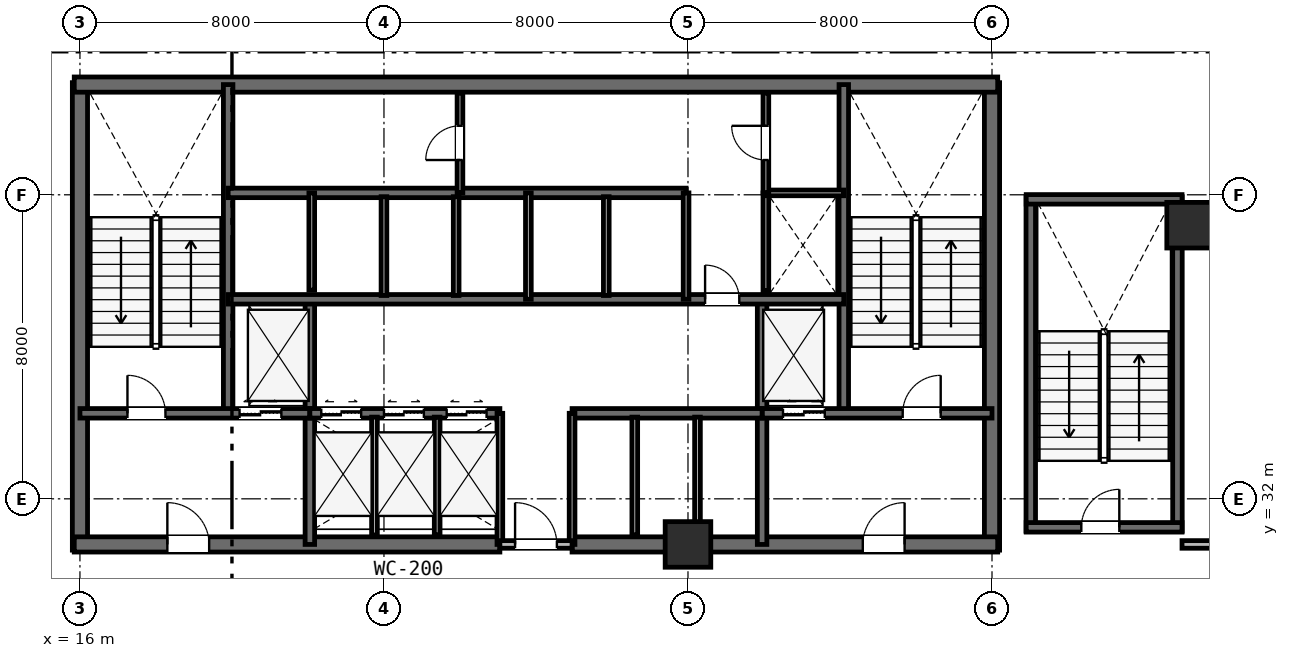
"""IFC4 building model, lengths in metres.
Left out: names, types, materials, properties, quantities, classifications, styles, units other than length and angle.
Written with IfcOpenShell. Run it as: python <this file> out.ifc"""

import sys

from ifc_helpers import new_model, si_unit, direction, frame, frame_2d, origin, origin_2d, place, context, subcontext, project, spatial, rectangle, extrude, element, fill, save


model = new_model("IFC4")
c1 = context("Model", 3, precision=1e-05, world=origin(), true_north=direction((0.0, 1.0)))
c2 = subcontext(c1, "Body", "Model", "MODEL_VIEW")
j1 = project(units=[si_unit("LENGTHUNIT", "METRE"), si_unit("PLANEANGLEUNIT", "RADIAN")], contexts=[c1])
p1 = place(None, origin())
s1 = spatial("IfcSite", under=j1, at=p1, CompositionType="ELEMENT")
p2 = place(p1, origin())
s2 = spatial("IfcBuilding", under=s1, at=p2, CompositionType="ELEMENT")
p3 = place(p2, frame((0.0, 0.0, -9.4)))
s3 = spatial("IfcBuildingStorey", under=s2, at=p3, CompositionType="ELEMENT", Elevation=-9.4)
for number, where, z_axis, x_axis in (
    (1, (16.0, 30.65, 0.0), (0.0, 0.0, 1.0), (0.0, 1.0, 0.0)),
    (2, (40.0, 30.65, 0.0), (0.0, 0.0, 1.0), (0.0, 1.0, 0.0)),
):
    element("IfcWall", number, at=place(p3, frame(where, z_axis=z_axis, x_axis=x_axis)), inside=s3, PredefinedType="SHEAR", context=c2, shape_type="SweptSolid", body=[
        extrude(rectangle(XDim=12.3, YDim=0.4, at=frame_2d((6.15, 0.0))), origin(), (0.0, 0.0, 1.0), 3.8),
    ])
p4 = place(p3, frame((15.85, 42.9, 0.0), z_axis=(0.0, 0.0, 1.0), x_axis=(1.0, 0.0, 0.0)))
e3 = element("IfcWall", 3, at=p4, inside=s3, PredefinedType="SHEAR", context=c2, shape_type="SweptSolid", body=[
    extrude(rectangle(XDim=24.3, YDim=0.4, at=frame_2d((12.15, 0.0))), origin(), (0.0, 0.0, 1.0), 3.8),
])
p5 = place(p3, frame((15.85, 30.8, 0.0), z_axis=(0.0, 0.0, 1.0), x_axis=(1.0, 0.0, 0.0)))
e4 = element("IfcWall", 4, at=p5, inside=s3, PredefinedType="SHEAR", context=c2, shape_type="SweptSolid", body=[
    extrude(rectangle(XDim=11.2, YDim=0.4, at=frame_2d((5.6, 0.0))), origin(), (0.0, 0.0, 1.0), 3.8),
])
p6 = place(p5, frame((2.45, 0.0, 0.0)))
e5 = element("IfcOpeningElement", 5, at=p6, cuts=e4, PredefinedType="OPENING", context=c2, shape_type="SweptSolid", body=[
    extrude(rectangle(XDim=1.1, YDim=2.15, at=frame_2d((0.55, 1.075))), frame((0.0, 0.21, 0.0), z_axis=(0.0, -1.0, 0.0), x_axis=(1.0, 0.0, 0.0)), (0.0, 0.0, 1.0), 0.42),
])
p7 = place(p3, frame((28.95, 30.8, 0.0), z_axis=(0.0, 0.0, 1.0), x_axis=(1.0, 0.0, 0.0)))
e6 = element("IfcWall", 6, at=p7, inside=s3, PredefinedType="SHEAR", context=c2, shape_type="SweptSolid", body=[
    extrude(rectangle(XDim=11.2, YDim=0.4, at=frame_2d((5.6, 0.0))), origin(), (0.0, 0.0, 1.0), 3.8),
])
p8 = place(p7, frame((7.65, 0.0, 0.0)))
e7 = element("IfcOpeningElement", 7, at=p8, cuts=e6, PredefinedType="OPENING", context=c2, shape_type="SweptSolid", body=[
    extrude(rectangle(XDim=1.1, YDim=2.15, at=frame_2d((0.55, 1.075))), frame((0.0, 0.21, 0.0), z_axis=(0.0, -1.0, 0.0), x_axis=(1.0, 0.0, 0.0)), (0.0, 0.0, 1.0), 0.42),
])
for number, where, z_axis, x_axis in (
    (8, (19.9, 34.25, 0.0), (0.0, 0.0, 1.0), (0.0, 1.0, 0.0)),
    (9, (36.1, 34.25, 0.0), (0.0, 0.0, 1.0), (0.0, 1.0, 0.0)),
):
    element("IfcWall", number, at=place(p3, frame(where, z_axis=z_axis, x_axis=x_axis)), inside=s3, PredefinedType="SHEAR", context=c2, shape_type="SweptSolid", body=[
        extrude(rectangle(XDim=8.65, YDim=0.25, at=frame_2d((4.325, 0.0))), origin(), (0.0, 0.0, 1.0), 3.8),
    ])
for number, where, z_axis, x_axis in (
    (10, (22.05, 30.8, 0.0), (0.0, 0.0, 1.0), (0.0, 1.0, 0.0)),
    (11, (33.95, 30.8, 0.0), (0.0, 0.0, 1.0), (0.0, 1.0, 0.0)),
):
    element("IfcWall", number, at=place(p3, frame(where, z_axis=z_axis, x_axis=x_axis)), inside=s3, PredefinedType="SHEAR", context=c2, shape_type="SweptSolid", body=[
        extrude(rectangle(XDim=6.45, YDim=0.25, at=frame_2d((3.225, 0.0))), origin(), (0.0, 0.0, 1.0), 3.8),
    ])
p9 = place(p3, frame((16.0, 34.25, 0.0), z_axis=(0.0, 0.0, 1.0), x_axis=(1.0, 0.0, 0.0)))
e12 = element("IfcWall", 12, at=p9, inside=s3, PredefinedType="SHEAR", context=c2, shape_type="SweptSolid", body=[
    extrude(rectangle(XDim=6.05, YDim=0.25, at=frame_2d((3.025, 0.0))), origin(), (0.0, 0.0, 1.0), 3.8),
])
p10 = place(p9, frame((1.25, 0.0, 0.0)))
e13 = element("IfcOpeningElement", 13, at=p10, cuts=e12, PredefinedType="OPENING", context=c2, shape_type="SweptSolid", body=[
    extrude(rectangle(XDim=1.0, YDim=2.15, at=frame_2d((0.5, 1.075))), frame((0.0, 0.135, 0.0), z_axis=(0.0, -1.0, 0.0), x_axis=(1.0, 0.0, 0.0)), (0.0, 0.0, 1.0), 0.27),
])
p11 = place(p9, frame((4.2, 0.0, 0.0)))
e14 = element("IfcOpeningElement", 14, at=p11, cuts=e12, PredefinedType="OPENING", context=c2, shape_type="SweptSolid", body=[
    extrude(rectangle(XDim=1.1, YDim=2.15, at=frame_2d((0.55, 1.075))), frame((0.0, 0.135, 0.0), z_axis=(0.0, -1.0, 0.0), x_axis=(1.0, 0.0, 0.0)), (0.0, 0.0, 1.0), 0.27),
])
p12 = place(p3, frame((33.95, 34.25, 0.0), z_axis=(0.0, 0.0, 1.0), x_axis=(1.0, 0.0, 0.0)))
e15 = element("IfcWall", 15, at=p12, inside=s3, PredefinedType="SHEAR", context=c2, shape_type="SweptSolid", body=[
    extrude(rectangle(XDim=6.05, YDim=0.25, at=frame_2d((3.025, 0.0))), origin(), (0.0, 0.0, 1.0), 3.8),
])
p13 = place(p12, frame((3.7, 0.0, 0.0)))
e16 = element("IfcOpeningElement", 16, at=p13, cuts=e15, PredefinedType="OPENING", context=c2, shape_type="SweptSolid", body=[
    extrude(rectangle(XDim=1.0, YDim=2.15, at=frame_2d((0.5, 1.075))), frame((0.0, 0.135, 0.0), z_axis=(0.0, -1.0, 0.0), x_axis=(1.0, 0.0, 0.0)), (0.0, 0.0, 1.0), 0.27),
])
p14 = place(p12, frame((0.55, 0.0, 0.0)))
e17 = element("IfcOpeningElement", 17, at=p14, cuts=e15, PredefinedType="OPENING", context=c2, shape_type="SweptSolid", body=[
    extrude(rectangle(XDim=1.1, YDim=2.15, at=frame_2d((0.55, 1.075))), frame((0.0, 0.135, 0.0), z_axis=(0.0, -1.0, 0.0), x_axis=(1.0, 0.0, 0.0)), (0.0, 0.0, 1.0), 0.27),
])
p15 = place(p3, frame((22.05, 34.25, 0.0), z_axis=(0.0, 0.0, 1.0), x_axis=(1.0, 0.0, 0.0)))
e18 = element("IfcWall", 18, at=p15, inside=s3, PredefinedType="SHEAR", context=c2, shape_type="SweptSolid", body=[
    extrude(rectangle(XDim=5.0, YDim=0.25, at=frame_2d((2.5, 0.0))), origin(), (0.0, 0.0, 1.0), 3.8),
])
p16 = place(p15, frame((0.3, 0.0, 0.0)))
e19 = element("IfcOpeningElement", 19, at=p16, cuts=e18, PredefinedType="OPENING", context=c2, shape_type="SweptSolid", body=[
    extrude(rectangle(XDim=1.05, YDim=2.15, at=frame_2d((0.525, 1.075))), frame((0.0, 0.135, 0.0), z_axis=(0.0, -1.0, 0.0), x_axis=(1.0, 0.0, 0.0)), (0.0, 0.0, 1.0), 0.27),
])
p17 = place(p15, frame((1.95, 0.0, 0.0)))
e20 = element("IfcOpeningElement", 20, at=p17, cuts=e18, PredefinedType="OPENING", context=c2, shape_type="SweptSolid", body=[
    extrude(rectangle(XDim=1.05, YDim=2.15, at=frame_2d((0.525, 1.075))), frame((0.0, 0.135, 0.0), z_axis=(0.0, -1.0, 0.0), x_axis=(1.0, 0.0, 0.0)), (0.0, 0.0, 1.0), 0.27),
])
p18 = place(p15, frame((3.6, 0.0, 0.0)))
e21 = element("IfcOpeningElement", 21, at=p18, cuts=e18, PredefinedType="OPENING", context=c2, shape_type="SweptSolid", body=[
    extrude(rectangle(XDim=1.05, YDim=2.15, at=frame_2d((0.525, 1.075))), frame((0.0, 0.135, 0.0), z_axis=(0.0, -1.0, 0.0), x_axis=(1.0, 0.0, 0.0)), (0.0, 0.0, 1.0), 0.27),
])
p19 = place(p3, frame((28.95, 34.25, 0.0), z_axis=(0.0, 0.0, 1.0), x_axis=(1.0, 0.0, 0.0)))
e22 = element("IfcWall", 22, at=p19, inside=s3, PredefinedType="SHEAR", context=c2, shape_type="SweptSolid", body=[
    extrude(rectangle(XDim=5.0, YDim=0.25, at=frame_2d((2.5, 0.0))), origin(), (0.0, 0.0, 1.0), 3.8),
])
p20 = place(p3, frame((19.9, 37.25, 0.0), z_axis=(0.0, 0.0, 1.0), x_axis=(1.0, 0.0, 0.0)))
e23 = element("IfcWall", 23, at=p20, inside=s3, PredefinedType="SHEAR", context=c2, shape_type="SweptSolid", body=[
    extrude(rectangle(XDim=16.2, YDim=0.25, at=frame_2d((8.1, 0.0))), origin(), (0.0, 0.0, 1.0), 3.8),
])
p21 = place(p20, frame((12.55, 0.0, 0.0)))
e24 = element("IfcOpeningElement", 24, at=p21, cuts=e23, PredefinedType="OPENING", context=c2, shape_type="SweptSolid", body=[
    extrude(rectangle(XDim=0.9, YDim=2.15, at=frame_2d((0.45, 1.075))), frame((0.0, 0.135, 0.0), z_axis=(0.0, -1.0, 0.0), x_axis=(1.0, 0.0, 0.0)), (0.0, 0.0, 1.0), 0.27),
])
p22 = place(p3, frame((19.9, 40.05, 0.0), z_axis=(0.0, 0.0, 1.0), x_axis=(1.0, 0.0, 0.0)))
e25 = element("IfcWall", 25, at=p22, inside=s3, PredefinedType="SHEAR", context=c2, shape_type="SweptSolid", body=[
    extrude(rectangle(XDim=12.05, YDim=0.25, at=frame_2d((6.025, 0.0))), origin(), (0.0, 0.0, 1.0), 3.8),
])
for number, where, z_axis, x_axis in (
    (26, (41.02, 31.15, 0.0), (0.0, 0.0, 1.0), (0.0, 1.0, 0.0)),
    (27, (44.88, 31.15, 0.0), (0.0, 0.0, 1.0), (0.0, 1.0, 0.0)),
):
    element("IfcWall", number, at=place(p3, frame(where, z_axis=z_axis, x_axis=x_axis)), inside=s3, PredefinedType="SHEAR", context=c2, shape_type="SweptSolid", body=[
        extrude(rectangle(XDim=8.8, YDim=0.25, at=frame_2d((4.4, 0.0))), origin(), (0.0, 0.0, 1.0), 3.8),
    ])
p23 = place(p3, frame((40.9, 39.88, 0.0), z_axis=(0.0, 0.0, 1.0), x_axis=(1.0, 0.0, 0.0)))
e28 = element("IfcWall", 28, at=p23, inside=s3, PredefinedType="SHEAR", context=c2, shape_type="SweptSolid", body=[
    extrude(rectangle(XDim=4.1, YDim=0.25, at=frame_2d((2.05, 0.0))), origin(), (0.0, 0.0, 1.0), 3.8),
])
p24 = place(p3, frame((40.9, 31.25, 0.0), z_axis=(0.0, 0.0, 1.0), x_axis=(1.0, 0.0, 0.0)))
e29 = element("IfcWall", 29, at=p24, inside=s3, PredefinedType="SHEAR", context=c2, shape_type="SweptSolid", body=[
    extrude(rectangle(XDim=4.1, YDim=0.25, at=frame_2d((2.05, 0.0))), origin(), (0.0, 0.0, 1.0), 3.8),
])
p25 = place(p24, frame((1.45, 0.0, 0.0)))
e30 = element("IfcOpeningElement", 30, at=p25, cuts=e29, PredefinedType="OPENING", context=c2, shape_type="SweptSolid", body=[
    extrude(rectangle(XDim=1.0, YDim=2.15, at=frame_2d((0.5, 1.075))), frame((0.0, 0.135, 0.0), z_axis=(0.0, -1.0, 0.0), x_axis=(1.0, 0.0, 0.0)), (0.0, 0.0, 1.0), 0.27),
])
for number, where, z_axis, x_axis in (
    (31, (45.2, 39.2, 0.0), (0.0, 0.0, 1.0), (1.0, 0.0, 0.0)),
    (32, (32.0, 30.8, 0.0), (0.0, 0.0, 1.0), (1.0, 0.0, 0.0)),
):
    element("IfcColumn", number, at=place(p3, frame(where, z_axis=z_axis, x_axis=x_axis)), inside=s3, PredefinedType="COLUMN", context=c2, shape_type="SweptSolid", body=[
        extrude(rectangle(XDim=1.2, YDim=1.2, at=origin_2d()), origin(), (0.0, 0.0, 1.0), 3.8),
    ])
for number, where, z_axis, x_axis in (
    (33, (27.05, 30.8, 0.0), (0.0, 0.0, 1.0), (0.0, 1.0, 0.0)),
    (34, (28.95, 30.8, 0.0), (0.0, 0.0, 1.0), (0.0, 1.0, 0.0)),
):
    element("IfcWall", number, at=place(p3, frame(where, z_axis=z_axis, x_axis=x_axis)), inside=s3, PredefinedType="PLUMBINGWALL", context=c2, shape_type="SweptSolid", body=[
        extrude(rectangle(XDim=3.45, YDim=0.15, at=frame_2d((1.725, 0.0))), origin(), (0.0, 0.0, 1.0), 3.49),
    ])
p26 = place(p3, frame((27.05, 30.8, 0.0), z_axis=(0.0, 0.0, 1.0), x_axis=(1.0, 0.0, 0.0)))
e35 = element("IfcWall", 35, at=p26, inside=s3, PredefinedType="PARTITIONING", context=c2, shape_type="SweptSolid", body=[
    extrude(rectangle(XDim=1.9, YDim=0.2, at=frame_2d((0.95, 0.0))), origin(), (0.0, 0.0, 1.0), 3.49),
])
p27 = place(p26, frame((0.4, 0.0, 0.0)))
e36 = element("IfcOpeningElement", 36, at=p27, cuts=e35, PredefinedType="OPENING", context=c2, shape_type="SweptSolid", body=[
    extrude(rectangle(XDim=1.1, YDim=2.15, at=frame_2d((0.55, 1.075))), frame((0.0, 0.11, 0.0), z_axis=(0.0, -1.0, 0.0), x_axis=(1.0, 0.0, 0.0)), (0.0, 0.0, 1.0), 0.22),
])
for number, where, z_axis, x_axis in (
    (37, (23.75, 31.05, 0.0), (0.0, 0.0, 1.0), (0.0, 1.0, 0.0)),
    (38, (25.4, 31.05, 0.0), (0.0, 0.0, 1.0), (0.0, 1.0, 0.0)),
    (39, (30.6, 31.05, 0.0), (0.0, 0.0, 1.0), (0.0, 1.0, 0.0)),
):
    element("IfcWall", number, at=place(p3, frame(where, z_axis=z_axis, x_axis=x_axis)), inside=s3, PredefinedType="PLUMBINGWALL", context=c2, shape_type="SweptSolid", body=[
        extrude(rectangle(XDim=3.1, YDim=0.15, at=frame_2d((1.55, 0.0))), origin(), (0.0, 0.0, 1.0), 3.49),
    ])
p28 = place(p3, frame((32.25, 31.05, 0.0), z_axis=(0.0, 0.0, 1.0), x_axis=(0.0, 1.0, 0.0)))
e40 = element("IfcWall", 40, at=p28, inside=s3, PredefinedType="PLUMBINGWALL", context=c2, shape_type="SweptSolid", body=[
    extrude(rectangle(XDim=3.1, YDim=0.15, at=frame_2d((1.55, 0.0))), origin(), (0.0, 0.0, 1.0), 2.88),
])
p29 = place(p3, frame((22.1, 37.49, 0.0), z_axis=(0.0, 0.0, 1.0), x_axis=(0.0, 1.0, 0.0)))
e41 = element("IfcWall", 41, at=p29, inside=s3, PredefinedType="PLUMBINGWALL", context=c2, shape_type="SweptSolid", body=[
    extrude(rectangle(XDim=2.56, YDim=0.15, at=frame_2d((1.28, 0.0))), origin(), (0.0, 0.0, 1.0), 3.49),
])
p30 = place(p3, frame((27.8, 37.25, 0.0), z_axis=(0.0, 0.0, 1.0), x_axis=(0.0, 1.0, 0.0)))
e42 = element("IfcWall", 42, at=p30, inside=s3, PredefinedType="PLUMBINGWALL", context=c2, shape_type="SweptSolid", body=[
    extrude(rectangle(XDim=2.8, YDim=0.15, at=frame_2d((1.4, 0.0))), origin(), (0.0, 0.0, 1.0), 3.49),
])
for number, where, z_axis, x_axis in (
    (43, (24.0, 37.35, 0.0), (0.0, 0.0, 1.0), (0.0, 1.0, 0.0)),
    (44, (25.9, 37.35, 0.0), (0.0, 0.0, 1.0), (0.0, 1.0, 0.0)),
):
    element("IfcWall", number, at=place(p3, frame(where, z_axis=z_axis, x_axis=x_axis)), inside=s3, PredefinedType="PLUMBINGWALL", context=c2, shape_type="SweptSolid", body=[
        extrude(rectangle(XDim=2.6, YDim=0.15, at=frame_2d((1.3, 0.0))), origin(), (0.0, 0.0, 1.0), 3.49),
    ])
p31 = place(p3, frame((31.95, 37.25, 0.0), z_axis=(0.0, 0.0, 1.0), x_axis=(0.0, 1.0, 0.0)))
e45 = element("IfcWall", 45, at=p31, inside=s3, PredefinedType="PLUMBINGWALL", context=c2, shape_type="SweptSolid", body=[
    extrude(rectangle(XDim=2.8, YDim=0.15, at=frame_2d((1.4, 0.0))), origin(), (0.0, 0.0, 1.0), 3.49),
])
p32 = place(p3, frame((29.85, 37.35, 0.0), z_axis=(0.0, 0.0, 1.0), x_axis=(0.0, 1.0, 0.0)))
e46 = element("IfcWall", 46, at=p32, inside=s3, PredefinedType="PLUMBINGWALL", context=c2, shape_type="SweptSolid", body=[
    extrude(rectangle(XDim=2.6, YDim=0.15, at=frame_2d((1.3, 0.0))), origin(), (0.0, 0.0, 1.0), 3.49),
])
p33 = place(p3, frame((34.05, 37.473, 0.0), z_axis=(0.0, 0.0, 1.0), x_axis=(0.0, 1.0, 0.0)))
e47 = element("IfcWall", 47, at=p33, inside=s3, PredefinedType="PLUMBINGWALL", context=c2, shape_type="SweptSolid", body=[
    extrude(rectangle(XDim=2.577, YDim=0.15, at=frame_2d((1.288, 0.0))), origin(), (0.0, 0.0, 1.0), 3.49),
])
p34 = place(p3, frame((34.05, 40.05, 0.0), z_axis=(0.0, 0.0, 1.0), x_axis=(1.0, 0.0, 0.0)))
e48 = element("IfcWall", 48, at=p34, inside=s3, PredefinedType="PARTITIONING", context=c2, shape_type="SweptSolid", body=[
    extrude(rectangle(XDim=2.05, YDim=0.15, at=frame_2d((1.025, 0.0))), origin(), (0.0, 0.0, 1.0), 3.49),
])
p35 = place(p3, frame((34.05, 40.05, 0.0), z_axis=(0.0, 0.0, 1.0), x_axis=(0.0, 1.0, 0.0)))
e49 = element("IfcWall", 49, at=p35, inside=s3, PredefinedType="PARTITIONING", context=c2, shape_type="SweptSolid", body=[
    extrude(rectangle(XDim=2.63, YDim=0.15, at=frame_2d((1.315, 0.0))), origin(), (0.0, 0.0, 1.0), 3.49),
])
p36 = place(p35, frame((0.865, 0.0, 0.0)))
e50 = element("IfcOpeningElement", 50, at=p36, cuts=e49, PredefinedType="OPENING", context=c2, shape_type="SweptSolid", body=[
    extrude(rectangle(XDim=0.9, YDim=2.15, at=frame_2d((0.45, 1.075))), frame((0.0, 0.085, 0.0), z_axis=(0.0, -1.0, 0.0), x_axis=(1.0, 0.0, 0.0)), (0.0, 0.0, 1.0), 0.17),
])
p37 = place(p3, frame((26.0, 40.05, 0.0), z_axis=(0.0, 0.0, 1.0), x_axis=(0.0, 1.0, 0.0)))
e51 = element("IfcWall", 51, at=p37, inside=s3, PredefinedType="PARTITIONING", context=c2, shape_type="SweptSolid", body=[
    extrude(rectangle(XDim=2.63, YDim=0.15, at=frame_2d((1.315, 0.0))), origin(), (0.0, 0.0, 1.0), 3.49),
])
p38 = place(p37, frame((0.865, 0.0, 0.0)))
e52 = element("IfcOpeningElement", 52, at=p38, cuts=e51, PredefinedType="OPENING", context=c2, shape_type="SweptSolid", body=[
    extrude(rectangle(XDim=0.9, YDim=2.15, at=frame_2d((0.45, 1.075))), frame((0.0, 0.085, 0.0), z_axis=(0.0, -1.0, 0.0), x_axis=(1.0, 0.0, 0.0)), (0.0, 0.0, 1.0), 0.17),
])
p39 = place(p3, frame((45.0, 30.8, 0.0), z_axis=(0.0, 0.0, 1.0), x_axis=(1.0, 0.0, 0.0)))
e53 = element("IfcWall", 53, at=p39, inside=s3, PredefinedType="PARTITIONING", context=c2, shape_type="SweptSolid", body=[
    extrude(rectangle(XDim=10.45, YDim=0.2, at=frame_2d((5.225, 0.0))), origin(), (0.0, 0.0, 1.0), 2.88),
])
p40 = place(p27, origin())
e54 = element("IfcDoor", 54, at=p40, inside=s3, OperationType="SINGLE_SWING_LEFT", PredefinedType="DOOR", context=c2, shape_type="SweptSolid", body=[
    extrude(rectangle(XDim=1.1, YDim=2.15, at=frame_2d((0.55, 1.075))), frame((0.0, 0.025, 0.0), z_axis=(0.0, -1.0, 0.0), x_axis=(1.0, 0.0, 0.0)), (0.0, 0.0, 1.0), 0.05),
])
fill(e36, e54)
p41 = place(p10, origin())
e55 = element("IfcDoor", 55, at=p41, inside=s3, OperationType="SINGLE_SWING_LEFT", PredefinedType="DOOR", context=c2, shape_type="SweptSolid", body=[
    extrude(rectangle(XDim=1.0, YDim=2.15, at=frame_2d((0.5, 1.075))), frame((0.0, 0.025, 0.0), z_axis=(0.0, -1.0, 0.0), x_axis=(1.0, 0.0, 0.0)), (0.0, 0.0, 1.0), 0.05),
])
fill(e13, e55)
p42 = place(p13, origin())
e56 = element("IfcDoor", 56, at=p42, inside=s3, OperationType="SINGLE_SWING_RIGHT", PredefinedType="DOOR", context=c2, shape_type="SweptSolid", body=[
    extrude(rectangle(XDim=1.0, YDim=2.15, at=frame_2d((0.5, 1.075))), frame((0.0, 0.025, 0.0), z_axis=(0.0, -1.0, 0.0), x_axis=(1.0, 0.0, 0.0)), (0.0, 0.0, 1.0), 0.05),
])
fill(e16, e56)
p43 = place(p6, origin())
e57 = element("IfcDoor", 57, at=p43, inside=s3, OperationType="SINGLE_SWING_LEFT", PredefinedType="DOOR", context=c2, shape_type="SweptSolid", body=[
    extrude(rectangle(XDim=1.1, YDim=2.15, at=frame_2d((0.55, 1.075))), frame((0.0, 0.025, 0.0), z_axis=(0.0, -1.0, 0.0), x_axis=(1.0, 0.0, 0.0)), (0.0, 0.0, 1.0), 0.05),
])
fill(e5, e57)
p44 = place(p8, origin())
e58 = element("IfcDoor", 58, at=p44, inside=s3, OperationType="SINGLE_SWING_RIGHT", PredefinedType="DOOR", context=c2, shape_type="SweptSolid", body=[
    extrude(rectangle(XDim=1.1, YDim=2.15, at=frame_2d((0.55, 1.075))), frame((0.0, 0.025, 0.0), z_axis=(0.0, -1.0, 0.0), x_axis=(1.0, 0.0, 0.0)), (0.0, 0.0, 1.0), 0.05),
])
fill(e7, e58)
p45 = place(p25, origin())
e59 = element("IfcDoor", 59, at=p45, inside=s3, OperationType="SINGLE_SWING_RIGHT", PredefinedType="DOOR", context=c2, shape_type="SweptSolid", body=[
    extrude(rectangle(XDim=1.0, YDim=2.15, at=frame_2d((0.5, 1.075))), frame((0.0, 0.025, 0.0), z_axis=(0.0, -1.0, 0.0), x_axis=(1.0, 0.0, 0.0)), (0.0, 0.0, 1.0), 0.05),
])
fill(e30, e59)
p46 = place(p21, origin())
e60 = element("IfcDoor", 60, at=p46, inside=s3, OperationType="SINGLE_SWING_LEFT", PredefinedType="DOOR", context=c2, shape_type="SweptSolid", body=[
    extrude(rectangle(XDim=0.9, YDim=2.15, at=frame_2d((0.45, 1.075))), frame((0.0, 0.025, 0.0), z_axis=(0.0, -1.0, 0.0), x_axis=(1.0, 0.0, 0.0)), (0.0, 0.0, 1.0), 0.05),
])
fill(e24, e60)
p47 = place(p36, origin())
e61 = element("IfcDoor", 61, at=p47, inside=s3, OperationType="SINGLE_SWING_RIGHT", PredefinedType="DOOR", context=c2, shape_type="SweptSolid", body=[
    extrude(rectangle(XDim=0.9, YDim=2.15, at=frame_2d((0.45, 1.075))), frame((0.0, 0.025, 0.0), z_axis=(0.0, -1.0, 0.0), x_axis=(1.0, 0.0, 0.0)), (0.0, 0.0, 1.0), 0.05),
])
fill(e50, e61)
p48 = place(p38, origin())
e62 = element("IfcDoor", 62, at=p48, inside=s3, OperationType="SINGLE_SWING_LEFT", PredefinedType="DOOR", context=c2, shape_type="SweptSolid", body=[
    extrude(rectangle(XDim=0.9, YDim=2.15, at=frame_2d((0.45, 1.075))), frame((0.0, 0.025, 0.0), z_axis=(0.0, -1.0, 0.0), x_axis=(1.0, 0.0, 0.0)), (0.0, 0.0, 1.0), 0.05),
])
fill(e52, e62)
p49 = place(p11, origin())
e63 = element("IfcDoor", 63, at=p49, inside=s3, OperationType="DOUBLE_DOOR_SLIDING", PredefinedType="DOOR", context=c2, shape_type="SweptSolid", body=[
    extrude(rectangle(XDim=1.1, YDim=2.15, at=frame_2d((0.55, 1.075))), frame((0.0, 0.025, 0.0), z_axis=(0.0, -1.0, 0.0), x_axis=(1.0, 0.0, 0.0)), (0.0, 0.0, 1.0), 0.05),
])
fill(e14, e63)
p50 = place(p14, origin())
e64 = element("IfcDoor", 64, at=p50, inside=s3, OperationType="DOUBLE_DOOR_SLIDING", PredefinedType="DOOR", context=c2, shape_type="SweptSolid", body=[
    extrude(rectangle(XDim=1.1, YDim=2.15, at=frame_2d((0.55, 1.075))), frame((0.0, 0.025, 0.0), z_axis=(0.0, -1.0, 0.0), x_axis=(1.0, 0.0, 0.0)), (0.0, 0.0, 1.0), 0.05),
])
fill(e17, e64)
p51 = place(p16, origin())
e65 = element("IfcDoor", 65, at=p51, inside=s3, OperationType="DOUBLE_DOOR_SLIDING", PredefinedType="DOOR", context=c2, shape_type="SweptSolid", body=[
    extrude(rectangle(XDim=1.05, YDim=2.15, at=frame_2d((0.525, 1.075))), frame((0.0, 0.025, 0.0), z_axis=(0.0, -1.0, 0.0), x_axis=(1.0, 0.0, 0.0)), (0.0, 0.0, 1.0), 0.05),
])
fill(e19, e65)
p52 = place(p17, origin())
e66 = element("IfcDoor", 66, at=p52, inside=s3, OperationType="DOUBLE_DOOR_SLIDING", PredefinedType="DOOR", context=c2, shape_type="SweptSolid", body=[
    extrude(rectangle(XDim=1.05, YDim=2.15, at=frame_2d((0.525, 1.075))), frame((0.0, 0.025, 0.0), z_axis=(0.0, -1.0, 0.0), x_axis=(1.0, 0.0, 0.0)), (0.0, 0.0, 1.0), 0.05),
])
fill(e20, e66)
p53 = place(p18, origin())
e67 = element("IfcDoor", 67, at=p53, inside=s3, OperationType="DOUBLE_DOOR_SLIDING", PredefinedType="DOOR", context=c2, shape_type="SweptSolid", body=[
    extrude(rectangle(XDim=1.05, YDim=2.15, at=frame_2d((0.525, 1.075))), frame((0.0, 0.025, 0.0), z_axis=(0.0, -1.0, 0.0), x_axis=(1.0, 0.0, 0.0)), (0.0, 0.0, 1.0), 0.05),
])
fill(e21, e67)
save(model, sys.argv[1])
